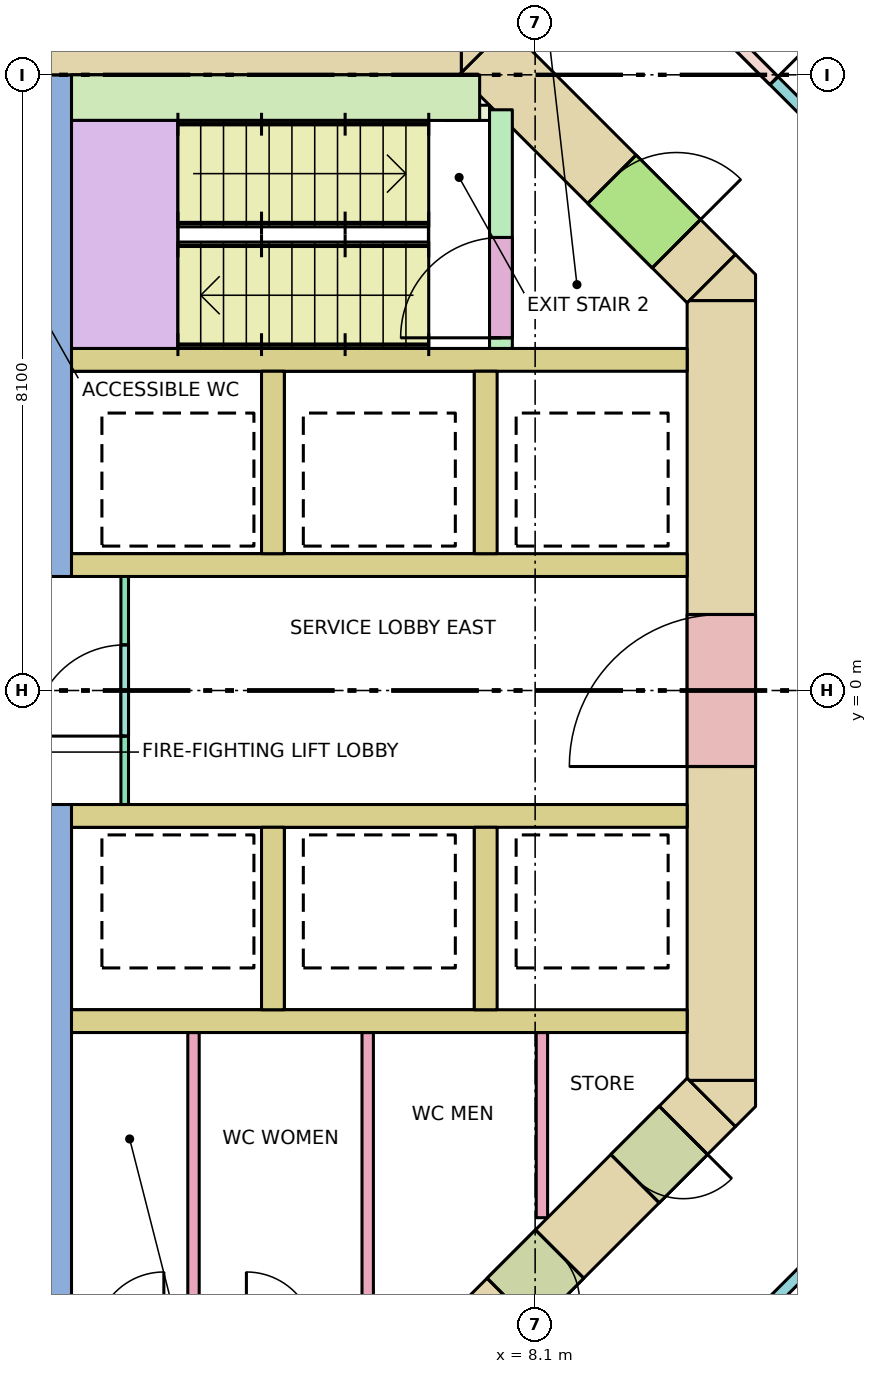
"""IFC4 building model, lengths in metres.
Left out: names, types, materials, properties, quantities, classifications, styles, units other than length and angle.
Written with IfcOpenShell. Run it as: python <this file> out.ifc"""

import sys

from ifc_helpers import new_model, si_unit, direction, frame, frame_2d, origin, place, context, subcontext, project, spatial, polyline, rectangle, outline, extrude, element, fill, save


model = new_model("IFC4")
c1 = context("Model", 3, precision=1e-05, world=origin(), true_north=direction((0.0, 1.0)))
c2 = subcontext(c1, "Body", "Model", "MODEL_VIEW")
j1 = project(units=[si_unit("LENGTHUNIT", "METRE"), si_unit("PLANEANGLEUNIT", "RADIAN")], contexts=[c1])
p1 = place(None, origin())
s1 = spatial("IfcSite", under=j1, at=p1, CompositionType="ELEMENT")
p2 = place(p1, origin())
s2 = spatial("IfcBuilding", under=s1, at=p2, CompositionType="ELEMENT")
p3 = place(p2, frame((0.0, 0.0, 98.6)))
s3 = spatial("IfcBuildingStorey", under=s2, at=p3, CompositionType="ELEMENT", Elevation=98.6)
p4 = place(p3, frame((-7.13, 8.55, -0.28), z_axis=(0.0, 0.0, 1.0), x_axis=(1.0, 0.0, 0.0)))
e1 = element("IfcWall", 1, at=p4, inside=s3, PredefinedType="SHEAR", context=c2, shape_type="SweptSolid", body=[
    extrude(rectangle(XDim=14.26, YDim=0.9, at=frame_2d((7.13, 0.0))), origin(), (0.0, 0.0, 1.0), 4.0),
])
p5 = place(p4, frame((5.48, 0.0, 0.28)))
e2 = element("IfcOpeningElement", 2, at=p5, cuts=e1, PredefinedType="OPENING", context=c2, shape_type="SweptSolid", body=[
    extrude(rectangle(XDim=0.7, YDim=2.1, at=frame_2d((0.35, 1.05))), frame((0.0, 0.46, 0.0), z_axis=(0.0, -1.0, 0.0), x_axis=(1.0, 0.0, 0.0)), (0.0, 0.0, 1.0), 0.92),
])
p6 = place(p4, frame((7.155, 0.0, 0.28)))
e3 = element("IfcOpeningElement", 3, at=p6, cuts=e1, PredefinedType="OPENING", context=c2, shape_type="SweptSolid", body=[
    extrude(rectangle(XDim=0.9, YDim=2.1, at=frame_2d((0.45, 1.05))), frame((0.0, 0.46, 0.0), z_axis=(0.0, -1.0, 0.0), x_axis=(1.0, 0.0, 0.0)), (0.0, 0.0, 1.0), 0.92),
])
p7 = place(p3, frame((10.55, -5.13, -0.28), z_axis=(0.0, 0.0, 1.0), x_axis=(0.0, 1.0, 0.0)))
e4 = element("IfcWall", 4, at=p7, inside=s3, PredefinedType="SHEAR", context=c2, shape_type="SweptSolid", body=[
    extrude(rectangle(XDim=10.26, YDim=0.9, at=frame_2d((5.13, 0.0))), origin(), (0.0, 0.0, 1.0), 4.0),
])
p8 = place(p7, frame((4.13, 0.0, 0.28)))
e5 = element("IfcOpeningElement", 5, at=p8, cuts=e4, PredefinedType="OPENING", context=c2, shape_type="SweptSolid", body=[
    extrude(rectangle(XDim=2.0, YDim=2.1, at=frame_2d((1.0, 1.05))), frame((0.0, 0.46, 0.0), z_axis=(0.0, -1.0, 0.0), x_axis=(1.0, 0.0, 0.0)), (0.0, 0.0, 1.0), 0.92),
])
p9 = place(p3, frame((7.418, 8.418, -0.28), z_axis=(0.0, 0.0, 1.0), x_axis=(0.707106781187, -0.707106781187, 0.0)))
e6 = element("IfcWall", 6, at=p9, inside=s3, PredefinedType="SHEAR", context=c2, shape_type="SweptSolid", body=[
    extrude(rectangle(XDim=4.243, YDim=0.9, at=frame_2d((2.121, 0.0))), origin(), (0.0, 0.0, 1.0), 4.0),
])
p10 = place(p9, frame((2.393, 0.0, 0.28)))
e7 = element("IfcOpeningElement", 7, at=p10, cuts=e6, PredefinedType="OPENING", context=c2, shape_type="SweptSolid", body=[
    extrude(rectangle(XDim=1.2, YDim=2.1, at=frame_2d((0.6, 1.05))), frame((0.0, 0.46, 0.0), z_axis=(0.0, -1.0, 0.0), x_axis=(1.0, 0.0, 0.0)), (0.0, 0.0, 1.0), 0.92),
])
p11 = place(p3, frame((10.418, -5.418, -0.28), z_axis=(0.0, 0.0, 1.0), x_axis=(-0.707106781187, -0.707106781187, 0.0)))
e8 = element("IfcWall", 8, at=p11, inside=s3, PredefinedType="SHEAR", context=c2, shape_type="SweptSolid", body=[
    extrude(rectangle(XDim=4.243, YDim=0.9, at=frame_2d((2.121, 0.0))), origin(), (0.0, 0.0, 1.0), 4.0),
])
p12 = place(p11, frame((2.823, 0.0, 0.28)))
e9 = element("IfcOpeningElement", 9, at=p12, cuts=e8, PredefinedType="OPENING", context=c2, shape_type="SweptSolid", body=[
    extrude(rectangle(XDim=0.9, YDim=2.1, at=frame_2d((0.45, 1.05))), frame((0.0, 0.46, 0.0), z_axis=(0.0, -1.0, 0.0), x_axis=(1.0, 0.0, 0.0)), (0.0, 0.0, 1.0), 0.92),
])
p13 = place(p11, frame((0.52, 0.0, 0.28)))
e10 = element("IfcOpeningElement", 10, at=p13, cuts=e8, PredefinedType="OPENING", context=c2, shape_type="SweptSolid", body=[
    extrude(rectangle(XDim=0.9, YDim=2.1, at=frame_2d((0.45, 1.05))), frame((0.0, 0.46, 0.0), z_axis=(0.0, -1.0, 0.0), x_axis=(1.0, 0.0, 0.0)), (0.0, 0.0, 1.0), 0.92),
])
p14 = place(p3, frame((0.0, 0.0, -0.28)))
e11 = element("IfcWall", 11, at=p14, inside=s3, PredefinedType="SHEAR", context=c2, shape_type="SweptSolid", body=[
    extrude(outline(polyline([(11.0, -5.473), (10.736, -5.736), (10.13, -5.13), (11.0, -5.13), (11.0, -5.473)])), origin(), (0.0, 0.0, 1.0), 4.0),
])
p15 = place(p3, frame((0.0, 0.0, -0.28)))
e12 = element("IfcWall", 12, at=p15, inside=s3, PredefinedType="SHEAR", context=c2, shape_type="SweptSolid", body=[
    extrude(outline(polyline([(11.0, 5.473), (11.0, 5.13), (10.13, 5.13), (10.736, 5.736), (11.0, 5.473)])), origin(), (0.0, 0.0, 1.0), 4.0),
])
p16 = place(p3, frame((0.0, 0.0, -0.28)))
e13 = element("IfcWall", 13, at=p16, inside=s3, PredefinedType="SHEAR", context=c2, shape_type="SweptSolid", body=[
    extrude(outline(polyline([(7.473, 9.0), (7.736, 8.736), (7.13, 8.13), (7.13, 9.0), (7.473, 9.0)])), origin(), (0.0, 0.0, 1.0), 4.0),
])
for number, where, z_axis, x_axis in (
    (14, (2.0, 4.35, 0.0), (0.0, 0.0, 1.0), (1.0, 0.0, 0.0)),
    (15, (2.0, -4.35, 0.0), (0.0, 0.0, 1.0), (1.0, 0.0, 0.0)),
    (16, (2.0, 1.65, 0.0), (0.0, 0.0, 1.0), (1.0, 0.0, 0.0)),
    (17, (2.0, -1.65, 0.0), (0.0, 0.0, 1.0), (1.0, 0.0, 0.0)),
):
    element("IfcWall", number, at=place(p3, frame(where, z_axis=z_axis, x_axis=x_axis)), inside=s3, PredefinedType="SOLIDWALL", context=c2, shape_type="SweptSolid", body=[
        extrude(rectangle(XDim=8.1, YDim=0.3, at=frame_2d((4.05, 0.0))), origin(), (0.0, 0.0, 1.0), 3.72),
    ])
for number, where, z_axis, x_axis in (
    (18, (4.65, 1.8, 0.0), (0.0, 0.0, 1.0), (0.0, 1.0, 0.0)),
    (19, (4.65, -4.2, 0.0), (0.0, 0.0, 1.0), (0.0, 1.0, 0.0)),
    (20, (7.45, 1.8, 0.0), (0.0, 0.0, 1.0), (0.0, 1.0, 0.0)),
    (21, (7.45, -4.2, 0.0), (0.0, 0.0, 1.0), (0.0, 1.0, 0.0)),
):
    element("IfcWall", number, at=place(p3, frame(where, z_axis=z_axis, x_axis=x_axis)), inside=s3, PredefinedType="SOLIDWALL", context=c2, shape_type="SweptSolid", body=[
        extrude(rectangle(XDim=2.4, YDim=0.3, at=frame_2d((1.2, 0.0))), origin(), (0.0, 0.0, 1.0), 3.72),
    ])
for number, where, z_axis, x_axis in (
    (22, (1.85, 1.5, 0.0), (0.0, 0.0, 1.0), (0.0, 1.0, 0.0)),
    (23, (1.85, -8.1, 0.0), (0.0, 0.0, 1.0), (0.0, 1.0, 0.0)),
):
    element("IfcWall", number, at=place(p3, frame(where, z_axis=z_axis, x_axis=x_axis)), inside=s3, PredefinedType="SHEAR", context=c2, shape_type="SweptSolid", body=[
        extrude(rectangle(XDim=6.6, YDim=0.3, at=frame_2d((3.3, 0.0))), origin(), (0.0, 0.0, 1.0), 3.72),
    ])
p17 = place(p3, frame((7.65, 4.5, 0.0), z_axis=(0.0, 0.0, 1.0), x_axis=(0.0, 1.0, 0.0)))
e24 = element("IfcWall", 24, at=p17, inside=s3, PredefinedType="SHEAR", context=c2, shape_type="SweptSolid", body=[
    extrude(rectangle(XDim=3.14, YDim=0.3, at=frame_2d((1.57, 0.0))), origin(), (0.0, 0.0, 1.0), 3.72),
])
p18 = place(p17, frame((0.14, 0.0, 0.0)))
e25 = element("IfcOpeningElement", 25, at=p18, cuts=e24, PredefinedType="OPENING", context=c2, shape_type="SweptSolid", body=[
    extrude(rectangle(XDim=1.32, YDim=2.1, at=frame_2d((0.66, 1.05))), frame((0.0, 0.16, 0.0), z_axis=(0.0, -1.0, 0.0), x_axis=(1.0, 0.0, 0.0)), (0.0, 0.0, 1.0), 0.32),
])
p19 = place(p3, frame((2.0, 7.8, 0.0), z_axis=(0.0, 0.0, 1.0), x_axis=(1.0, 0.0, 0.0)))
e26 = element("IfcWall", 26, at=p19, inside=s3, PredefinedType="SHEAR", context=c2, shape_type="SweptSolid", body=[
    extrude(rectangle(XDim=5.37, YDim=0.6, at=frame_2d((2.685, 0.0))), origin(), (0.0, 0.0, 1.0), 3.72),
])
p20 = place(p3, frame((6.9, 7.6, 0.0), z_axis=(0.0, 0.0, 1.0), x_axis=(1.0, 0.0, 0.0)))
e27 = element("IfcWall", 27, at=p20, inside=s3, PredefinedType="SHEAR", context=c2, shape_type="SweptSolid", body=[
    extrude(rectangle(XDim=0.6, YDim=0.2, at=frame_2d((0.3, 0.0))), origin(), (0.0, 0.0, 1.0), 3.72),
])
p21 = place(p3, frame((2.7, -1.5, 0.0), z_axis=(0.0, 0.0, 1.0), x_axis=(0.0, 1.0, 0.0)))
e28 = element("IfcWall", 28, at=p21, inside=s3, PredefinedType="PARTITIONING", context=c2, shape_type="SweptSolid", body=[
    extrude(rectangle(XDim=3.0, YDim=0.1, at=frame_2d((1.5, 0.0))), origin(), (0.0, 0.0, 1.0), 3.72),
])
p22 = place(p21, frame((0.9, 0.0, 0.0)))
e29 = element("IfcOpeningElement", 29, at=p22, cuts=e28, PredefinedType="OPENING", context=c2, shape_type="SweptSolid", body=[
    extrude(rectangle(XDim=1.2, YDim=2.1, at=frame_2d((0.6, 1.05))), frame((0.0, 0.06, 0.0), z_axis=(0.0, -1.0, 0.0), x_axis=(1.0, 0.0, 0.0)), (0.0, 0.0, 1.0), 0.12),
])
for number, where, z_axis, x_axis in (
    (30, (3.605, -8.1, 0.0), (0.0, 0.0, 1.0), (0.0, 1.0, 0.0)),
    (31, (5.897, -8.1, 0.0), (0.0, 0.0, 1.0), (0.0, 1.0, 0.0)),
):
    element("IfcWall", number, at=place(p3, frame(where, z_axis=z_axis, x_axis=x_axis)), inside=s3, PredefinedType="PARTITIONING", context=c2, shape_type="SweptSolid", body=[
        extrude(rectangle(XDim=3.6, YDim=0.15, at=frame_2d((1.8, 0.0))), origin(), (0.0, 0.0, 1.0), 3.72),
    ])
p23 = place(p3, frame((8.189, -6.936, 0.0), z_axis=(0.0, 0.0, 1.0), x_axis=(0.0, 1.0, 0.0)))
e32 = element("IfcWall", 32, at=p23, inside=s3, PredefinedType="PARTITIONING", context=c2, shape_type="SweptSolid", body=[
    extrude(rectangle(XDim=2.436, YDim=0.15, at=frame_2d((1.218, 0.0))), origin(), (0.0, 0.0, 1.0), 3.72),
])
p24 = place(p3, frame((8.291, 10.975, 0.0), z_axis=(0.0, 0.0, 1.0), x_axis=(0.707106781187, -0.707106781187, 0.0)))
e33 = element("IfcWall", 33, at=p24, inside=s3, PredefinedType="PARTITIONING", context=c2, shape_type="SweptSolid", body=[
    extrude(rectangle(XDim=6.624, YDim=0.15, at=frame_2d((3.312, 0.0))), origin(), (0.0, 0.0, 1.0), 2.82),
])
p25 = place(p24, frame((3.274, 0.0, 0.0)))
e34 = element("IfcOpeningElement", 34, at=p25, cuts=e33, PredefinedType="OPENING", context=c2, shape_type="SweptSolid", body=[
    extrude(rectangle(XDim=0.9, YDim=2.1, at=frame_2d((0.45, 1.05))), frame((0.0, 0.085, 0.0), z_axis=(0.0, -1.0, 0.0), x_axis=(1.0, 0.0, 0.0)), (0.0, 0.0, 1.0), 0.17),
])
p26 = place(p24, frame((0.524, 0.0, 0.0)))
e35 = element("IfcOpeningElement", 35, at=p26, cuts=e33, PredefinedType="OPENING", context=c2, shape_type="SweptSolid", body=[
    extrude(rectangle(XDim=0.9, YDim=2.1, at=frame_2d((0.45, 1.05))), frame((0.0, 0.085, 0.0), z_axis=(0.0, -1.0, 0.0), x_axis=(1.0, 0.0, 0.0)), (0.0, 0.0, 1.0), 0.17),
])
p27 = place(p3, frame((12.975, -6.291, 0.0), z_axis=(0.0, 0.0, 1.0), x_axis=(-0.707125355289, -0.707088206597, 0.0)))
e36 = element("IfcWall", 36, at=p27, inside=s3, PredefinedType="PARTITIONING", context=c2, shape_type="SweptSolid", body=[
    extrude(rectangle(XDim=6.572, YDim=0.15, at=frame_2d((3.286, 0.0))), origin(), (0.0, 0.0, 1.0), 2.82),
])
p28 = place(p18, origin())
e37 = element("IfcDoor", 37, at=p28, inside=s3, OperationType="DOUBLE_DOOR_SINGLE_SWING", PredefinedType="DOOR", context=c2, shape_type="SweptSolid", body=[
    extrude(rectangle(XDim=1.32, YDim=2.1, at=frame_2d((0.66, 1.05))), frame((0.0, 0.025, 0.0), z_axis=(0.0, -1.0, 0.0), x_axis=(1.0, 0.0, 0.0)), (0.0, 0.0, 1.0), 0.05),
])
fill(e25, e37)
p29 = place(p10, origin())
e38 = element("IfcDoor", 38, at=p29, inside=s3, OperationType="SINGLE_SWING_RIGHT", PredefinedType="DOOR", context=c2, shape_type="SweptSolid", body=[
    extrude(rectangle(XDim=1.2, YDim=2.1, at=frame_2d((0.6, 1.05))), frame((0.0, 0.025, 0.0), z_axis=(0.0, -1.0, 0.0), x_axis=(1.0, 0.0, 0.0)), (0.0, 0.0, 1.0), 0.05),
])
fill(e7, e38)
p30 = place(p8, origin())
e39 = element("IfcDoor", 39, at=p30, inside=s3, OperationType="DOUBLE_DOOR_SINGLE_SWING", PredefinedType="DOOR", context=c2, shape_type="SweptSolid", body=[
    extrude(rectangle(XDim=2.0, YDim=2.1, at=frame_2d((1.0, 1.05))), frame((0.0, 0.025, 0.0), z_axis=(0.0, -1.0, 0.0), x_axis=(1.0, 0.0, 0.0)), (0.0, 0.0, 1.0), 0.05),
])
fill(e5, e39)
p31 = place(p22, origin())
e40 = element("IfcDoor", 40, at=p31, inside=s3, OperationType="SINGLE_SWING_LEFT", PredefinedType="DOOR", context=c2, shape_type="SweptSolid", body=[
    extrude(rectangle(XDim=1.2, YDim=2.1, at=frame_2d((0.6, 1.05))), frame((0.0, 0.025, 0.0), z_axis=(0.0, -1.0, 0.0), x_axis=(1.0, 0.0, 0.0)), (0.0, 0.0, 1.0), 0.05),
])
fill(e29, e40)
p32 = place(p12, origin())
e41 = element("IfcDoor", 41, at=p32, inside=s3, OperationType="SINGLE_SWING_RIGHT", PredefinedType="DOOR", context=c2, shape_type="SweptSolid", body=[
    extrude(rectangle(XDim=0.9, YDim=2.1, at=frame_2d((0.45, 1.05))), frame((0.0, 0.025, 0.0), z_axis=(0.0, -1.0, 0.0), x_axis=(1.0, 0.0, 0.0)), (0.0, 0.0, 1.0), 0.05),
])
fill(e9, e41)
p33 = place(p13, origin())
e42 = element("IfcDoor", 42, at=p33, inside=s3, OperationType="SINGLE_SWING_LEFT", PredefinedType="DOOR", context=c2, shape_type="SweptSolid", body=[
    extrude(rectangle(XDim=0.9, YDim=2.1, at=frame_2d((0.45, 1.05))), frame((0.0, 0.025, 0.0), z_axis=(0.0, -1.0, 0.0), x_axis=(1.0, 0.0, 0.0)), (0.0, 0.0, 1.0), 0.05),
])
fill(e10, e42)
p34 = place(p25, origin())
e43 = element("IfcDoor", 43, at=p34, inside=s3, OperationType="SINGLE_SWING_RIGHT", PredefinedType="DOOR", context=c2, shape_type="SweptSolid", body=[
    extrude(rectangle(XDim=0.9, YDim=2.1, at=frame_2d((0.45, 1.05))), frame((0.0, 0.025, 0.0), z_axis=(0.0, -1.0, 0.0), x_axis=(1.0, 0.0, 0.0)), (0.0, 0.0, 1.0), 0.05),
])
fill(e34, e43)
save(model, sys.argv[1])
